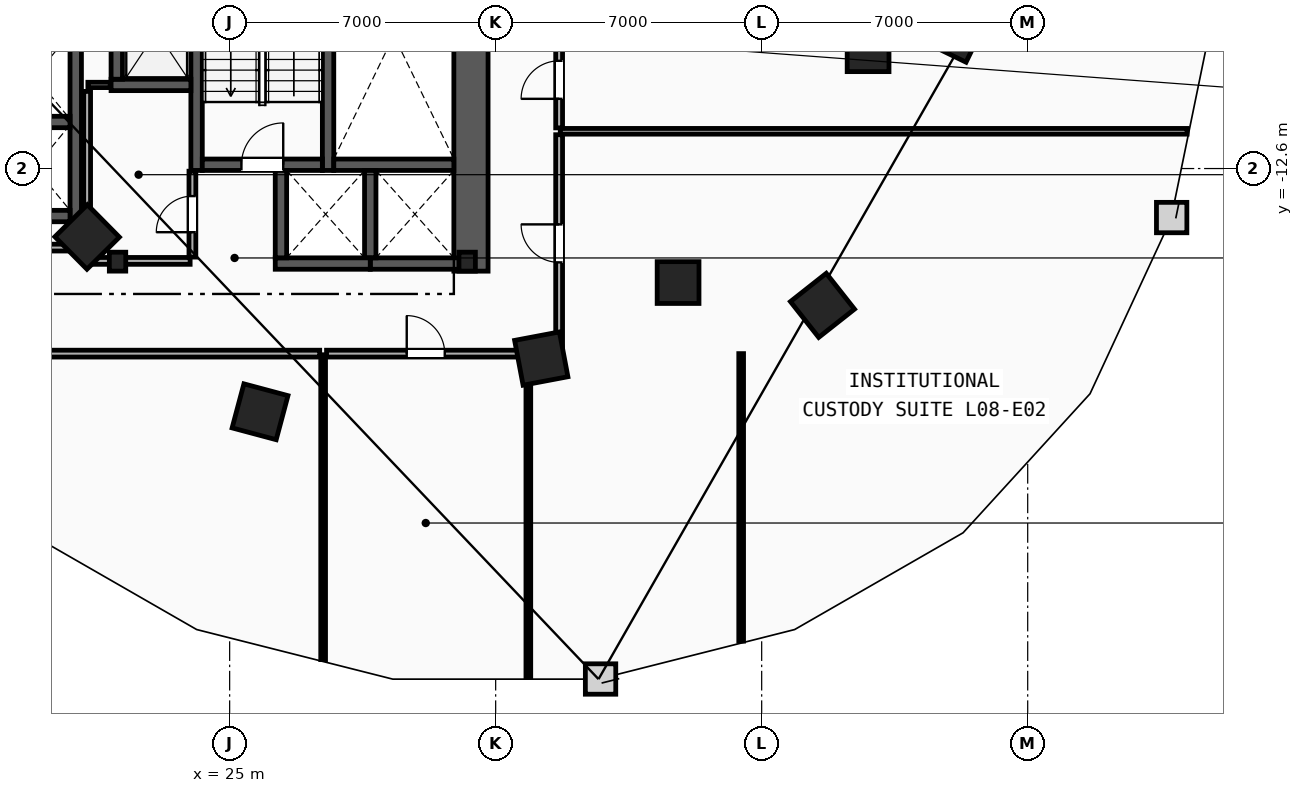
"""IFC4 building model, lengths in metres.
Left out: names, types, materials, properties, quantities, classifications, styles, units other than length and angle.
Written with IfcOpenShell. Run it as: python <this file> out.ifc"""

import sys

from ifc_helpers import new_model, si_unit, direction, frame, frame_2d, origin, origin_2d, place, context, subcontext, project, spatial, rectangle, i_section, extrude, element, fill, save


model = new_model("IFC4")
c1 = context("Model", 3, precision=1e-05, world=origin(), true_north=direction((0.0, 1.0)))
c2 = subcontext(c1, "Body", "Model", "MODEL_VIEW")
j1 = project(units=[si_unit("LENGTHUNIT", "METRE"), si_unit("PLANEANGLEUNIT", "RADIAN")], contexts=[c1])
p1 = place(None, origin())
s1 = spatial("IfcSite", under=j1, at=p1, CompositionType="ELEMENT")
p2 = place(p1, origin())
s2 = spatial("IfcBuilding", under=s1, at=p2, CompositionType="ELEMENT")
p3 = place(p2, frame((0.0, 0.0, 35.4)))
s3 = spatial("IfcBuildingStorey", under=s2, at=p3, CompositionType="ELEMENT", Elevation=35.4)
for number, where, z_axis, x_axis in (
    (1, (22.05, -15.05, 0.0), (0.0, 0.0, 1.0), (1.0, 0.0, 0.0)),
    (2, (31.25, -15.05, 0.0), (0.0, 0.0, 1.0), (1.0, 0.0, 0.0)),
):
    element("IfcColumn", number, at=place(p3, frame(where, z_axis=z_axis, x_axis=x_axis)), inside=s3, PredefinedType="COLUMN", context=c2, shape_type="SweptSolid", body=[
        extrude(i_section(OverallWidth=0.432, OverallDepth=0.498, WebThickness=0.056, FlangeThickness=0.089, FilletRadius=0.018, at=origin_2d()), origin(), (0.0, 0.0, 1.0), 3.8),
    ])
for number, where, z_axis, x_axis in (
    (3, (41.8, -9.5, 0.0), (0.0, 0.0, 1.0), (1.0, 0.0, 0.0)),
    (4, (36.8, -15.6, 0.0), (0.0, 0.0, 1.0), (1.0, 0.0, 0.0)),
):
    element("IfcColumn", number, at=place(p3, frame(where, z_axis=z_axis, x_axis=x_axis)), inside=s3, PredefinedType="COLUMN", context=c2, shape_type="SweptSolid", body=[
        extrude(rectangle(XDim=1.1, YDim=1.1, at=origin_2d()), origin(), (0.0, 0.0, 1.0), 3.8),
    ])
for number, where, z_axis, x_axis in (
    (5, (21.25, -14.4, 0.0), (0.0, 0.0, 1.0), (0.703, -0.711, 0.0)),
    (6, (25.8, -19.0, 0.0), (0.0, 0.0, 1.0), (0.966, -0.259, 0.0)),
    (7, (33.2, -17.6, 0.0), (0.0, 0.0, 1.0), (0.983, 0.186, 0.0)),
    (8, (40.6, -16.2, 0.0), (0.0, 0.0, 1.0), (0.785, 0.619, 0.0)),
    (9, (44.1, -9.0, 0.0), (0.0, 0.0, 1.0), (0.437, 0.899, 0.0)),
):
    element("IfcColumn", number, at=place(p3, frame(where, z_axis=z_axis, x_axis=x_axis)), inside=s3, PredefinedType="COLUMN", context=c2, shape_type="SweptSolid", body=[
        extrude(rectangle(XDim=1.2, YDim=1.2, at=origin_2d()), origin(), (0.0, 0.0, 1.0), 3.8),
    ])
p4 = place(p3, frame((31.35, -15.3, 0.0), z_axis=(0.0, 0.0, 1.0), x_axis=(0.0, 1.0, 0.0)))
e10 = element("IfcWall", 10, at=p4, inside=s3, PredefinedType="SHEAR", context=c2, shape_type="SweptSolid", body=[
    extrude(rectangle(XDim=13.33, YDim=0.9, at=frame_2d((6.665, 0.0))), origin(), (0.0, 0.0, 1.0), 3.5),
])
for number, where, z_axis, x_axis in (
    (11, (27.59, -12.65, 0.0), (0.0, 0.0, 1.0), (0.0, 1.0, 0.0)),
    (12, (24.13, -12.65, 0.0), (0.0, 0.0, 1.0), (0.0, 1.0, 0.0)),
):
    element("IfcWall", number, at=place(p3, frame(where, z_axis=z_axis, x_axis=x_axis)), inside=s3, PredefinedType="SHEAR", context=c2, shape_type="SweptSolid", body=[
        extrude(rectangle(XDim=10.68, YDim=0.3, at=frame_2d((5.34, 0.0))), origin(), (0.0, 0.0, 1.0), 3.5),
    ])
p5 = place(p3, frame((27.74, -12.5, 0.0), z_axis=(0.0, 0.0, 1.0), x_axis=(1.0, 0.0, 0.0)))
e13 = element("IfcWall", 13, at=p5, inside=s3, PredefinedType="SHEAR", context=c2, shape_type="SweptSolid", body=[
    extrude(rectangle(XDim=3.16, YDim=0.3, at=frame_2d((1.58, 0.0))), origin(), (0.0, 0.0, 1.0), 3.5),
])
p6 = place(p3, frame((24.28, -12.5, 0.0), z_axis=(0.0, 0.0, 1.0), x_axis=(1.0, 0.0, 0.0)))
e14 = element("IfcWall", 14, at=p6, inside=s3, PredefinedType="SHEAR", context=c2, shape_type="SweptSolid", body=[
    extrude(rectangle(XDim=3.16, YDim=0.3, at=frame_2d((1.58, 0.0))), origin(), (0.0, 0.0, 1.0), 3.5),
])
p7 = place(p6, frame((1.03, 0.0, 0.0)))
e15 = element("IfcOpeningElement", 15, at=p7, cuts=e14, PredefinedType="OPENING", context=c2, shape_type="SweptSolid", body=[
    extrude(rectangle(XDim=1.1, YDim=2.15, at=frame_2d((0.55, 1.075))), frame((0.0, 0.16, 0.0), z_axis=(0.0, -1.0, 0.0), x_axis=(1.0, 0.0, 0.0)), (0.0, 0.0, 1.0), 0.32),
])
p8 = place(p3, frame((21.88, -10.4, 0.0), z_axis=(0.0, 0.0, 1.0), x_axis=(1.0, 0.0, 0.0)))
e16 = element("IfcWall", 16, at=p8, inside=s3, PredefinedType="SHEAR", context=c2, shape_type="SweptSolid", body=[
    extrude(rectangle(XDim=2.1, YDim=0.3, at=frame_2d((1.05, 0.0))), origin(), (0.0, 0.0, 1.0), 3.5),
])
for number, where, z_axis, x_axis in (
    (17, (22.03, -10.25, 0.0), (0.0, 0.0, 1.0), (0.0, 1.0, 0.0)),
    (18, (28.7, -15.1, 0.0), (0.0, 0.0, 1.0), (1.0, 0.0, 0.0)),
):
    element("IfcWall", number, at=place(p3, frame(where, z_axis=z_axis, x_axis=x_axis)), inside=s3, PredefinedType="SHEAR", context=c2, shape_type="SweptSolid", body=[
        extrude(rectangle(XDim=2.5, YDim=0.3, at=frame_2d((1.25, 0.0))), origin(), (0.0, 0.0, 1.0), 3.5),
    ])
p9 = place(p3, frame((28.7, -14.95, 0.0), z_axis=(0.0, 0.0, 1.0), x_axis=(0.0, 1.0, 0.0)))
e19 = element("IfcWall", 19, at=p9, inside=s3, PredefinedType="SHEAR", context=c2, shape_type="SweptSolid", body=[
    extrude(rectangle(XDim=2.3, YDim=0.3, at=frame_2d((1.15, 0.0))), origin(), (0.0, 0.0, 1.0), 3.5),
])
p10 = place(p3, frame((26.2, -15.1, 0.0), z_axis=(0.0, 0.0, 1.0), x_axis=(1.0, 0.0, 0.0)))
e20 = element("IfcWall", 20, at=p10, inside=s3, PredefinedType="SHEAR", context=c2, shape_type="SweptSolid", body=[
    extrude(rectangle(XDim=2.5, YDim=0.3, at=frame_2d((1.25, 0.0))), origin(), (0.0, 0.0, 1.0), 3.5),
])
p11 = place(p3, frame((26.35, -14.95, 0.0), z_axis=(0.0, 0.0, 1.0), x_axis=(0.0, 1.0, 0.0)))
e21 = element("IfcWall", 21, at=p11, inside=s3, PredefinedType="SHEAR", context=c2, shape_type="SweptSolid", body=[
    extrude(rectangle(XDim=2.3, YDim=0.3, at=frame_2d((1.15, 0.0))), origin(), (0.0, 0.0, 1.0), 3.5),
])
p12 = place(p3, frame((20.95, -14.0, 0.0), z_axis=(0.0, 0.0, 1.0), x_axis=(0.0, 1.0, 0.0)))
e22 = element("IfcWall", 22, at=p12, inside=s3, PredefinedType="SHEAR", context=c2, shape_type="SweptSolid", body=[
    extrude(rectangle(XDim=10.05, YDim=0.3, at=frame_2d((5.025, 0.0))), origin(), (0.0, 0.0, 1.0), 3.5),
])
for number, where, z_axis, x_axis in (
    (23, (18.95, -13.85, 0.0), (0.0, 0.0, 1.0), (1.0, 0.0, 0.0)),
    (24, (18.95, -11.375, 0.0), (0.0, 0.0, 1.0), (1.0, 0.0, 0.0)),
):
    element("IfcWall", number, at=place(p3, frame(where, z_axis=z_axis, x_axis=x_axis)), inside=s3, PredefinedType="SHEAR", context=c2, shape_type="SweptSolid", body=[
        extrude(rectangle(XDim=1.85, YDim=0.3, at=frame_2d((0.925, 0.0))), origin(), (0.0, 0.0, 1.0), 3.5),
    ])
p13 = place(p3, frame((21.27, -10.4, 0.0), z_axis=(0.0, 0.0, 1.0), x_axis=(1.0, 0.0, 0.0)))
e25 = element("IfcWall", 25, at=p13, inside=s3, PredefinedType="PARTITIONING", context=c2, shape_type="SweptSolid", body=[
    extrude(rectangle(XDim=0.59, YDim=0.14, at=frame_2d((0.295, 0.0))), origin(), (0.0, 0.0, 1.0), 3.5),
])
p14 = place(p3, frame((21.25, -14.93, 0.0), z_axis=(0.0, 0.0, 1.0), x_axis=(0.0, 1.0, 0.0)))
e26 = element("IfcWall", 26, at=p14, inside=s3, PredefinedType="PARTITIONING", context=c2, shape_type="SweptSolid", body=[
    extrude(rectangle(XDim=4.36, YDim=0.18, at=frame_2d((2.18, 0.0))), origin(), (0.0, 0.0, 1.0), 3.5),
])
p15 = place(p3, frame((21.35, -15.03, 0.0), z_axis=(0.0, 0.0, 1.0), x_axis=(1.0, 0.0, 0.0)))
e27 = element("IfcWall", 27, at=p15, inside=s3, PredefinedType="PARTITIONING", context=c2, shape_type="SweptSolid", body=[
    extrude(rectangle(XDim=2.61, YDim=0.18, at=frame_2d((1.305, 0.0))), origin(), (0.0, 0.0, 1.0), 2.573),
])
p16 = place(p3, frame((24.02, -14.93, 0.0), z_axis=(0.0, 0.0, 1.0), x_axis=(0.0, 1.0, 0.0)))
e28 = element("IfcWall", 28, at=p16, inside=s3, PredefinedType="PARTITIONING", context=c2, shape_type="SweptSolid", body=[
    extrude(rectangle(XDim=2.26, YDim=0.18, at=frame_2d((1.13, 0.0))), origin(), (0.0, 0.0, 1.0), 3.5),
])
p17 = place(p16, frame((0.655, 0.0, 0.0)))
e29 = element("IfcOpeningElement", 29, at=p17, cuts=e28, PredefinedType="OPENING", context=c2, shape_type="SweptSolid", body=[
    extrude(rectangle(XDim=0.95, YDim=2.1, at=frame_2d((0.475, 1.05))), frame((0.0, 0.1, 0.0), z_axis=(0.0, -1.0, 0.0), x_axis=(1.0, 0.0, 0.0)), (0.0, 0.0, 1.0), 0.2),
])
p18 = place(p3, frame((33.7, -11.62, 0.0), z_axis=(0.0, 0.0, 1.0), x_axis=(1.0, 0.0, 0.0)))
e30 = element("IfcWall", 30, at=p18, inside=s3, PredefinedType="PARTITIONING", context=c2, shape_type="SweptSolid", body=[
    extrude(rectangle(XDim=16.494, YDim=0.15, at=frame_2d((8.247, 0.0))), origin(), (0.0, 0.0, 1.0), 3.5),
])
p19 = place(p3, frame((27.46, -25.521, 0.0), z_axis=(0.0, 0.0, 1.0), x_axis=(0.0, 1.0, 0.0)))
e31 = element("IfcWall", 31, at=p19, inside=s3, PredefinedType="PARTITIONING", context=c2, shape_type="SweptSolid", body=[
    extrude(rectangle(XDim=8.021, YDim=0.125, at=frame_2d((4.01, 0.0))), origin(), (0.0, 0.0, 1.0), 3.5),
])
p20 = place(p3, frame((32.86, -25.985, 0.0), z_axis=(0.0, 0.0, 1.0), x_axis=(0.0, 1.0, 0.0)))
e32 = element("IfcWall", 32, at=p20, inside=s3, PredefinedType="PARTITIONING", context=c2, shape_type="SweptSolid", body=[
    extrude(rectangle(XDim=8.485, YDim=0.125, at=frame_2d((4.243, 0.0))), origin(), (0.0, 0.0, 1.0), 3.5),
])
p21 = place(p3, frame((38.46, -25.035, 0.0), z_axis=(0.0, 0.0, 1.0), x_axis=(0.0, 1.0, 0.0)))
e33 = element("IfcWall", 33, at=p21, inside=s3, PredefinedType="PARTITIONING", context=c2, shape_type="SweptSolid", body=[
    extrude(rectangle(XDim=7.565, YDim=0.125, at=frame_2d((3.783, 0.0))), origin(), (0.0, 0.0, 1.0), 3.5),
])
p22 = place(p3, frame((27.55, -17.47, 0.0), z_axis=(0.0, 0.0, 1.0), x_axis=(1.0, 0.0, 0.0)))
e34 = element("IfcWall", 34, at=p22, inside=s3, PredefinedType="PARTITIONING", context=c2, shape_type="SweptSolid", body=[
    extrude(rectangle(XDim=5.22, YDim=0.18, at=frame_2d((2.61, 0.0))), origin(), (0.0, 0.0, 1.0), 3.5),
])
p23 = place(p22, frame((2.11, 0.0, 0.0)))
e35 = element("IfcOpeningElement", 35, at=p23, cuts=e34, PredefinedType="OPENING", context=c2, shape_type="SweptSolid", body=[
    extrude(rectangle(XDim=1.0, YDim=2.15, at=frame_2d((0.5, 1.075))), frame((0.0, 0.1, 0.0), z_axis=(0.0, -1.0, 0.0), x_axis=(1.0, 0.0, 0.0)), (0.0, 0.0, 1.0), 0.2),
])
p24 = place(p3, frame((33.67, -17.428, 0.0), z_axis=(0.0, 0.0, 1.0), x_axis=(0.0, 1.0, 0.0)))
e36 = element("IfcWall", 36, at=p24, inside=s3, PredefinedType="PARTITIONING", context=c2, shape_type="SweptSolid", body=[
    extrude(rectangle(XDim=5.719, YDim=0.18, at=frame_2d((2.859, 0.0))), origin(), (0.0, 0.0, 1.0), 3.5),
])
p25 = place(p24, frame((2.359, 0.0, 0.0)))
e37 = element("IfcOpeningElement", 37, at=p25, cuts=e36, PredefinedType="OPENING", context=c2, shape_type="SweptSolid", body=[
    extrude(rectangle(XDim=1.0, YDim=2.15, at=frame_2d((0.5, 1.075))), frame((0.0, 0.1, 0.0), z_axis=(0.0, -1.0, 0.0), x_axis=(1.0, 0.0, 0.0)), (0.0, 0.0, 1.0), 0.2),
])
p26 = place(p3, frame((32.95, -17.47, 0.0), z_axis=(0.0, 0.0, 1.0), x_axis=(1.0, 0.0, 0.0)))
e38 = element("IfcWall", 38, at=p26, inside=s3, PredefinedType="PARTITIONING", context=c2, shape_type="SweptSolid", body=[
    extrude(rectangle(XDim=0.678, YDim=0.18, at=frame_2d((0.339, 0.0))), origin(), (0.0, 0.0, 1.0), 3.5),
])
p27 = place(p3, frame((33.67, -11.53, 0.0), z_axis=(0.0, 0.0, 1.0), x_axis=(0.0, 1.0, 0.0)))
e39 = element("IfcWall", 39, at=p27, inside=s3, PredefinedType="PARTITIONING", context=c2, shape_type="SweptSolid", body=[
    extrude(rectangle(XDim=2.529, YDim=0.18, at=frame_2d((1.264, 0.0))), origin(), (0.0, 0.0, 1.0), 3.5),
])
p28 = place(p27, frame((0.764, 0.0, 0.0)))
e40 = element("IfcOpeningElement", 40, at=p28, cuts=e39, PredefinedType="OPENING", context=c2, shape_type="SweptSolid", body=[
    extrude(rectangle(XDim=1.0, YDim=2.15, at=frame_2d((0.5, 1.075))), frame((0.0, 0.1, 0.0), z_axis=(0.0, -1.0, 0.0), x_axis=(1.0, 0.0, 0.0)), (0.0, 0.0, 1.0), 0.2),
])
p29 = place(p3, frame((16.822, -17.47, 0.0), z_axis=(0.0, 0.0, 1.0), x_axis=(1.0, 0.0, 0.0)))
e41 = element("IfcWall", 41, at=p29, inside=s3, PredefinedType="PARTITIONING", context=c2, shape_type="SweptSolid", body=[
    extrude(rectangle(XDim=10.549, YDim=0.18, at=frame_2d((5.274, 0.0))), origin(), (0.0, 0.0, 1.0), 3.5),
])
p30 = place(p3, frame((21.178, -14.68, 0.0), z_axis=(0.0, 0.0, 1.0), x_axis=(-1.0, 0.0, 0.0)))
e42 = element("IfcWall", 42, at=p30, inside=s3, PredefinedType="PARTITIONING", context=c2, shape_type="SweptSolid", body=[
    extrude(rectangle(XDim=4.357, YDim=0.18, at=frame_2d((2.178, 0.0))), origin(), (0.0, 0.0, 1.0), 3.5),
])
p31 = place(p7, origin())
e43 = element("IfcDoor", 43, at=p31, inside=s3, OperationType="SINGLE_SWING_RIGHT", PredefinedType="DOOR", context=c2, shape_type="SweptSolid", body=[
    extrude(rectangle(XDim=1.1, YDim=2.15, at=frame_2d((0.55, 1.075))), frame((0.0, 0.025, 0.0), z_axis=(0.0, -1.0, 0.0), x_axis=(1.0, 0.0, 0.0)), (0.0, 0.0, 1.0), 0.05),
])
fill(e15, e43)
p32 = place(p25, origin())
e44 = element("IfcDoor", 44, at=p32, inside=s3, OperationType="SINGLE_SWING_RIGHT", PredefinedType="DOOR", context=c2, shape_type="SweptSolid", body=[
    extrude(rectangle(XDim=1.0, YDim=2.15, at=frame_2d((0.5, 1.075))), frame((0.0, 0.025, 0.0), z_axis=(0.0, -1.0, 0.0), x_axis=(1.0, 0.0, 0.0)), (0.0, 0.0, 1.0), 0.05),
])
fill(e37, e44)
p33 = place(p23, origin())
e45 = element("IfcDoor", 45, at=p33, inside=s3, OperationType="SINGLE_SWING_LEFT", PredefinedType="DOOR", context=c2, shape_type="SweptSolid", body=[
    extrude(rectangle(XDim=1.0, YDim=2.15, at=frame_2d((0.5, 1.075))), frame((0.0, 0.025, 0.0), z_axis=(0.0, -1.0, 0.0), x_axis=(1.0, 0.0, 0.0)), (0.0, 0.0, 1.0), 0.05),
])
fill(e35, e45)
p34 = place(p28, origin())
e46 = element("IfcDoor", 46, at=p34, inside=s3, OperationType="SINGLE_SWING_LEFT", PredefinedType="DOOR", context=c2, shape_type="SweptSolid", body=[
    extrude(rectangle(XDim=1.0, YDim=2.15, at=frame_2d((0.5, 1.075))), frame((0.0, 0.025, 0.0), z_axis=(0.0, -1.0, 0.0), x_axis=(1.0, 0.0, 0.0)), (0.0, 0.0, 1.0), 0.05),
])
fill(e40, e46)
p35 = place(p17, origin())
e47 = element("IfcDoor", 47, at=p35, inside=s3, OperationType="SINGLE_SWING_LEFT", PredefinedType="DOOR", context=c2, shape_type="SweptSolid", body=[
    extrude(rectangle(XDim=0.95, YDim=2.1, at=frame_2d((0.475, 1.05))), frame((0.0, 0.025, 0.0), z_axis=(0.0, -1.0, 0.0), x_axis=(1.0, 0.0, 0.0)), (0.0, 0.0, 1.0), 0.05),
])
fill(e29, e47)
save(model, sys.argv[1])
